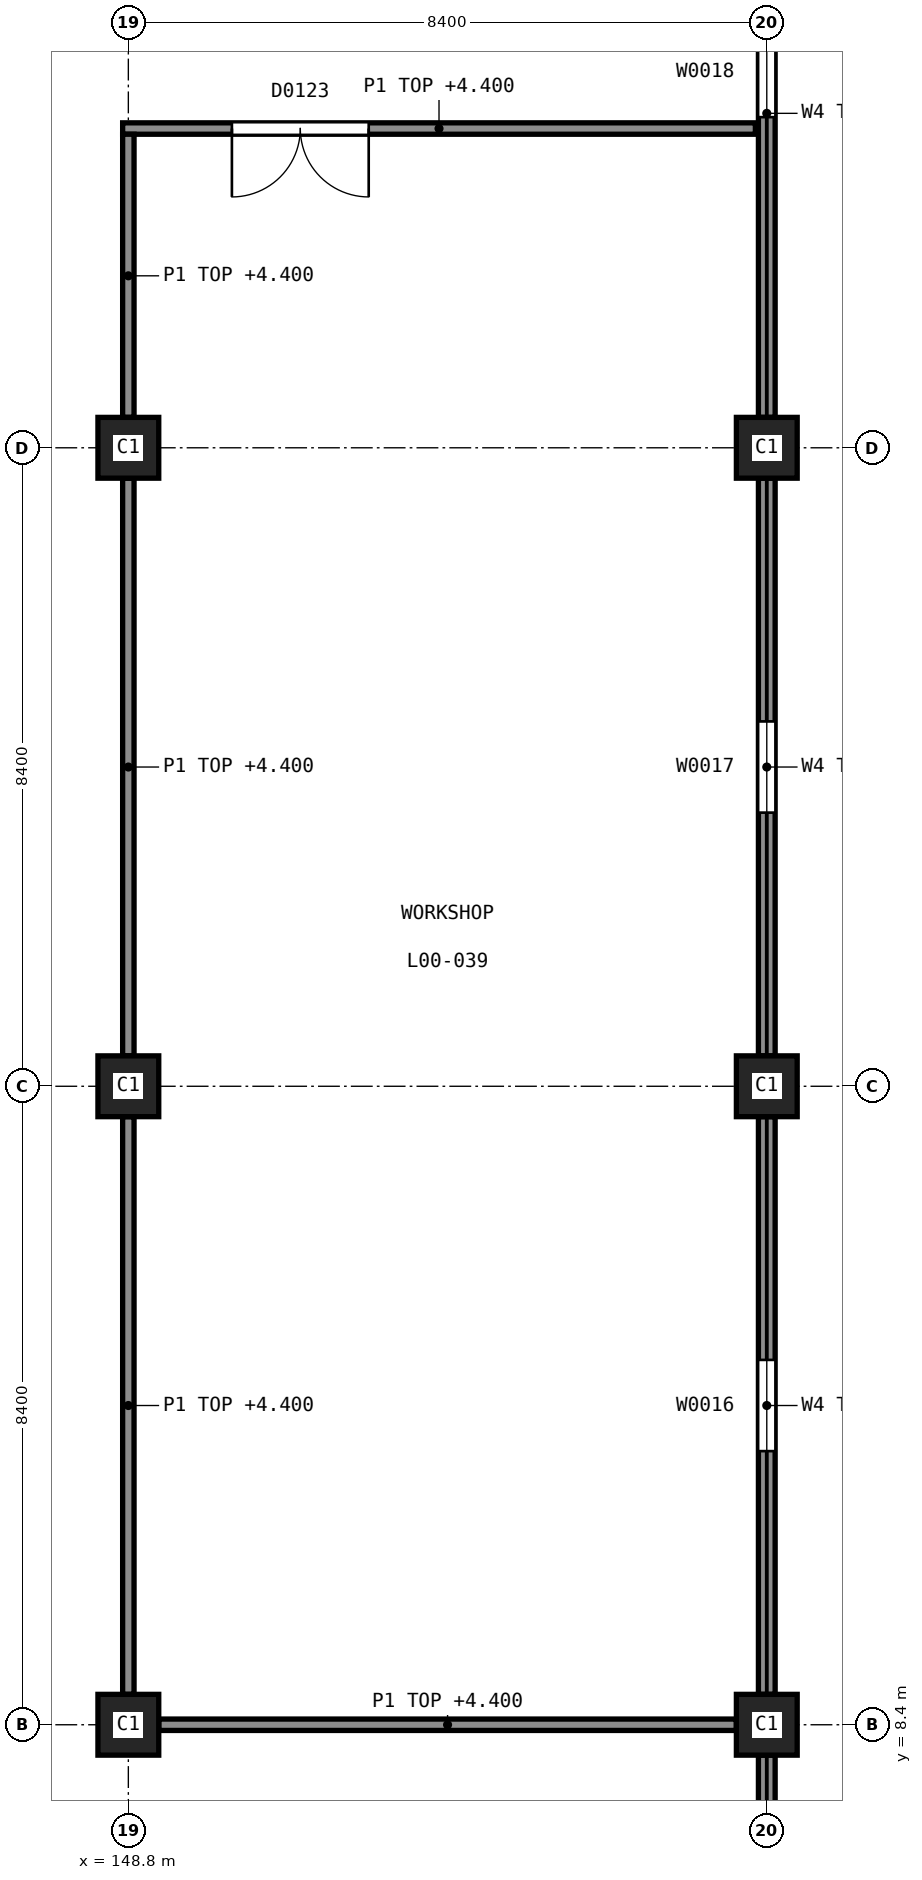
"""IFC4 building model, lengths in metres.
Left out: names, types, materials, properties, quantities, classifications, styles, units other than length and angle.
Written with IfcOpenShell. Run it as: python <this file> out.ifc"""

import sys

from ifc_helpers import new_model, si_unit, direction, frame, frame_2d, origin, origin_2d, place, context, subcontext, project, spatial, rectangle, extrude, element, fill, save


model = new_model("IFC4")
c1 = context("Model", 3, precision=1e-05, world=origin(), true_north=direction((0.0, 1.0)))
c2 = subcontext(c1, "Body", "Model", "MODEL_VIEW")
j1 = project(units=[si_unit("LENGTHUNIT", "METRE"), si_unit("PLANEANGLEUNIT", "RADIAN")], contexts=[c1])
p1 = place(None, origin())
s1 = spatial("IfcSite", under=j1, at=p1, CompositionType="ELEMENT")
p2 = place(p1, origin())
s2 = spatial("IfcBuilding", under=s1, at=p2, CompositionType="ELEMENT")
p3 = place(p2, origin())
s3 = spatial("IfcBuildingStorey", under=s2, at=p3, CompositionType="ELEMENT", Elevation=0.0)
for number, where, z_axis, x_axis in (
    (1, (148.8, 8.4, -0.3), (0.0, 0.0, 1.0), (1.0, 0.0, 0.0)),
    (2, (148.8, 16.8, -0.3), (0.0, 0.0, 1.0), (1.0, 0.0, 0.0)),
    (3, (148.8, 25.2, -0.3), (0.0, 0.0, 1.0), (1.0, 0.0, 0.0)),
    (4, (157.2, 8.4, -0.3), (0.0, 0.0, 1.0), (1.0, 0.0, 0.0)),
    (5, (157.2, 16.8, -0.3), (0.0, 0.0, 1.0), (1.0, 0.0, 0.0)),
    (6, (157.2, 25.2, -0.3), (0.0, 0.0, 1.0), (1.0, 0.0, 0.0)),
):
    element("IfcColumn", number, at=place(p3, frame(where, z_axis=z_axis, x_axis=x_axis)), inside=s3, PredefinedType="COLUMN", context=c2, shape_type="SweptSolid", body=[
        extrude(rectangle(XDim=0.8, YDim=0.8, at=origin_2d()), origin(), (0.0, 0.0, 1.0), 5.8),
    ])
p4 = place(p3, frame((157.2, 0.4, 0.0), z_axis=(0.0, 0.0, 1.0), x_axis=(0.0, 1.0, 0.0)))
e7 = element("IfcWall", 7, at=p4, inside=s3, PredefinedType="SOLIDWALL", context=c2, shape_type="SweptSolid", body=[
    extrude(rectangle(XDim=7.6, YDim=0.22, at=frame_2d((3.8, 0.0))), origin(), (0.0, 0.0, 1.0), 4.44),
])
p5 = place(p4, frame((3.95, 0.0, 2.1)))
e8 = element("IfcOpeningElement", 8, at=p5, cuts=e7, PredefinedType="OPENING", context=c2, shape_type="SweptSolid", body=[
    extrude(rectangle(XDim=1.2, YDim=0.6, at=frame_2d((0.6, 0.3))), frame((0.0, 0.12, 0.0), z_axis=(0.0, -1.0, 0.0), x_axis=(1.0, 0.0, 0.0)), (0.0, 0.0, 1.0), 0.24),
])
p6 = place(p3, frame((157.2, 8.8, 0.0), z_axis=(0.0, 0.0, 1.0), x_axis=(0.0, 1.0, 0.0)))
e9 = element("IfcWall", 9, at=p6, inside=s3, PredefinedType="SOLIDWALL", context=c2, shape_type="SweptSolid", body=[
    extrude(rectangle(XDim=7.6, YDim=0.22, at=frame_2d((3.8, 0.0))), origin(), (0.0, 0.0, 1.0), 4.44),
])
p7 = place(p6, frame((3.2, 0.0, 2.1)))
e10 = element("IfcOpeningElement", 10, at=p7, cuts=e9, PredefinedType="OPENING", context=c2, shape_type="SweptSolid", body=[
    extrude(rectangle(XDim=1.2, YDim=0.6, at=frame_2d((0.6, 0.3))), frame((0.0, 0.12, 0.0), z_axis=(0.0, -1.0, 0.0), x_axis=(1.0, 0.0, 0.0)), (0.0, 0.0, 1.0), 0.24),
])
p8 = place(p3, frame((157.2, 17.2, 0.0), z_axis=(0.0, 0.0, 1.0), x_axis=(0.0, 1.0, 0.0)))
e11 = element("IfcWall", 11, at=p8, inside=s3, PredefinedType="SOLIDWALL", context=c2, shape_type="SweptSolid", body=[
    extrude(rectangle(XDim=7.6, YDim=0.22, at=frame_2d((3.8, 0.0))), origin(), (0.0, 0.0, 1.0), 4.44),
])
p9 = place(p8, frame((3.2, 0.0, 2.1)))
e12 = element("IfcOpeningElement", 12, at=p9, cuts=e11, PredefinedType="OPENING", context=c2, shape_type="SweptSolid", body=[
    extrude(rectangle(XDim=1.2, YDim=0.6, at=frame_2d((0.6, 0.3))), frame((0.0, 0.12, 0.0), z_axis=(0.0, -1.0, 0.0), x_axis=(1.0, 0.0, 0.0)), (0.0, 0.0, 1.0), 0.24),
])
p10 = place(p3, frame((157.2, 25.6, 0.0), z_axis=(0.0, 0.0, 1.0), x_axis=(0.0, 1.0, 0.0)))
e13 = element("IfcWall", 13, at=p10, inside=s3, PredefinedType="SOLIDWALL", context=c2, shape_type="SweptSolid", body=[
    extrude(rectangle(XDim=8.0, YDim=0.22, at=frame_2d((4.0, 0.0))), origin(), (0.0, 0.0, 1.0), 4.44),
])
p11 = place(p10, frame((3.95, 0.0, 2.1)))
e14 = element("IfcOpeningElement", 14, at=p11, cuts=e13, PredefinedType="OPENING", context=c2, shape_type="SweptSolid", body=[
    extrude(rectangle(XDim=1.2, YDim=0.6, at=frame_2d((0.6, 0.3))), frame((0.0, 0.12, 0.0), z_axis=(0.0, -1.0, 0.0), x_axis=(1.0, 0.0, 0.0)), (0.0, 0.0, 1.0), 0.24),
])
p12 = place(p3, frame((148.725, 29.4, 0.0), z_axis=(0.0, 0.0, 1.0), x_axis=(1.0, 0.0, 0.0)))
e15 = element("IfcWall", 15, at=p12, inside=s3, PredefinedType="PARTITIONING", context=c2, shape_type="SweptSolid", body=[
    extrude(rectangle(XDim=8.325, YDim=0.15, at=frame_2d((4.163, 0.0))), origin(), (0.0, 0.0, 1.0), 4.4),
])
p13 = place(p12, frame((1.438, 0.0, 0.0)))
e16 = element("IfcOpeningElement", 16, at=p13, cuts=e15, PredefinedType="OPENING", context=c2, shape_type="SweptSolid", body=[
    extrude(rectangle(XDim=1.8, YDim=2.1, at=frame_2d((0.9, 1.05))), frame((0.0, 0.085, 0.0), z_axis=(0.0, -1.0, 0.0), x_axis=(1.0, 0.0, 0.0)), (0.0, 0.0, 1.0), 0.17),
])
p14 = place(p3, frame((149.2, 8.4, 0.0), z_axis=(0.0, 0.0, 1.0), x_axis=(1.0, 0.0, 0.0)))
e17 = element("IfcWall", 17, at=p14, inside=s3, PredefinedType="PARTITIONING", context=c2, shape_type="SweptSolid", body=[
    extrude(rectangle(XDim=7.6, YDim=0.15, at=frame_2d((3.8, 0.0))), origin(), (0.0, 0.0, 1.0), 4.4),
])
p15 = place(p3, frame((148.8, 8.8, 0.0), z_axis=(0.0, 0.0, 1.0), x_axis=(0.0, 1.0, 0.0)))
e18 = element("IfcWall", 18, at=p15, inside=s3, PredefinedType="PARTITIONING", context=c2, shape_type="SweptSolid", body=[
    extrude(rectangle(XDim=7.6, YDim=0.15, at=frame_2d((3.8, 0.0))), origin(), (0.0, 0.0, 1.0), 4.4),
])
p16 = place(p3, frame((148.8, 17.2, 0.0), z_axis=(0.0, 0.0, 1.0), x_axis=(0.0, 1.0, 0.0)))
e19 = element("IfcWall", 19, at=p16, inside=s3, PredefinedType="PARTITIONING", context=c2, shape_type="SweptSolid", body=[
    extrude(rectangle(XDim=7.6, YDim=0.15, at=frame_2d((3.8, 0.0))), origin(), (0.0, 0.0, 1.0), 4.4),
])
p17 = place(p3, frame((148.8, 25.6, 0.0), z_axis=(0.0, 0.0, 1.0), x_axis=(0.0, 1.0, 0.0)))
e20 = element("IfcWall", 20, at=p17, inside=s3, PredefinedType="PARTITIONING", context=c2, shape_type="SweptSolid", body=[
    extrude(rectangle(XDim=3.725, YDim=0.15, at=frame_2d((1.862, 0.0))), origin(), (0.0, 0.0, 1.0), 4.4),
])
p18 = place(p7, origin())
e21 = element("IfcWindow", 21, at=p18, inside=s3, PartitioningType="SINGLE_PANEL", PredefinedType="WINDOW", context=c2, shape_type="SweptSolid", body=[
    extrude(rectangle(XDim=1.2, YDim=0.6, at=frame_2d((0.6, 0.3))), frame((0.0, 0.09, 0.0), z_axis=(0.0, -1.0, 0.0), x_axis=(1.0, 0.0, 0.0)), (0.0, 0.0, 1.0), 0.06),
])
fill(e10, e21)
p19 = place(p9, origin())
e22 = element("IfcWindow", 22, at=p19, inside=s3, PartitioningType="SINGLE_PANEL", PredefinedType="WINDOW", context=c2, shape_type="SweptSolid", body=[
    extrude(rectangle(XDim=1.2, YDim=0.6, at=frame_2d((0.6, 0.3))), frame((0.0, 0.09, 0.0), z_axis=(0.0, -1.0, 0.0), x_axis=(1.0, 0.0, 0.0)), (0.0, 0.0, 1.0), 0.06),
])
fill(e12, e22)
p20 = place(p11, origin())
e23 = element("IfcWindow", 23, at=p20, inside=s3, PartitioningType="SINGLE_PANEL", PredefinedType="WINDOW", context=c2, shape_type="SweptSolid", body=[
    extrude(rectangle(XDim=1.2, YDim=0.6, at=frame_2d((0.6, 0.3))), frame((0.0, 0.09, 0.0), z_axis=(0.0, -1.0, 0.0), x_axis=(1.0, 0.0, 0.0)), (0.0, 0.0, 1.0), 0.06),
])
fill(e14, e23)
p21 = place(p13, origin())
e24 = element("IfcDoor", 24, at=p21, inside=s3, OperationType="DOUBLE_DOOR_SINGLE_SWING", PredefinedType="DOOR", context=c2, shape_type="SweptSolid", body=[
    extrude(rectangle(XDim=1.8, YDim=2.1, at=frame_2d((0.9, 1.05))), frame((0.0, 0.025, 0.0), z_axis=(0.0, -1.0, 0.0), x_axis=(1.0, 0.0, 0.0)), (0.0, 0.0, 1.0), 0.05),
])
fill(e16, e24)
save(model, sys.argv[1])
